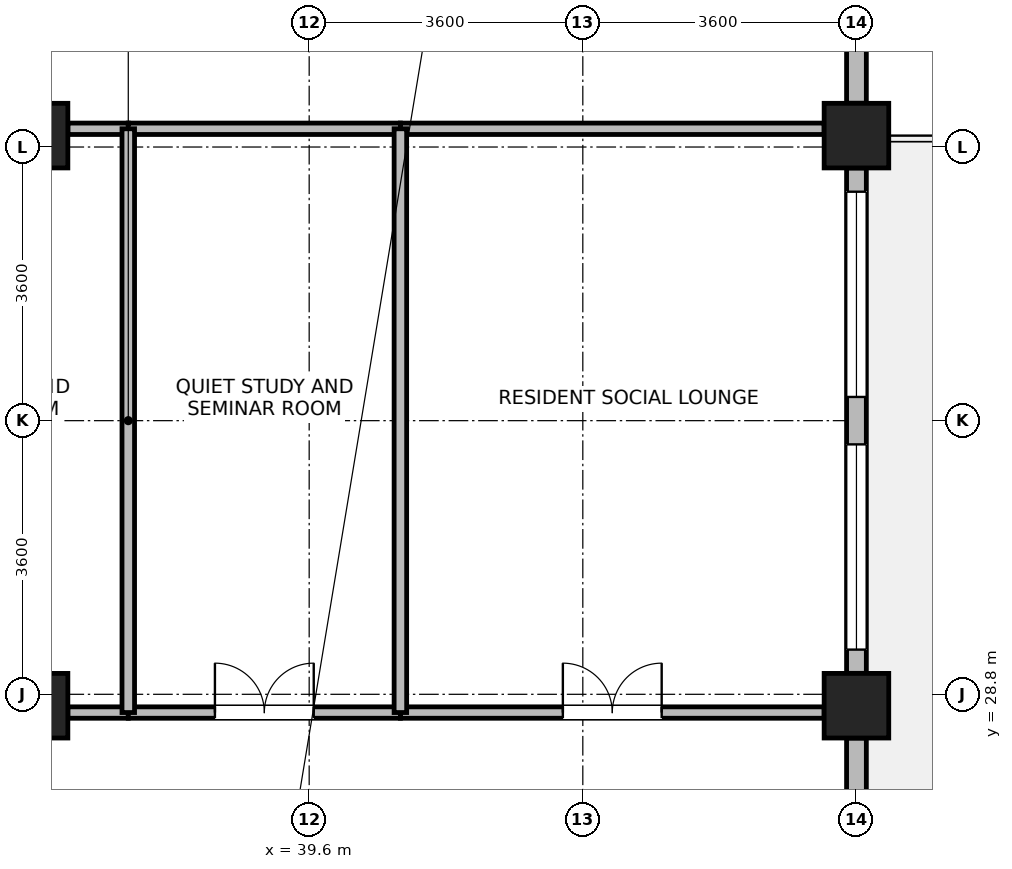
"""IFC4 building model, lengths in metres.
Left out: names, types, materials, properties, quantities, classifications, styles, units other than length and angle.
Written with IfcOpenShell. Run it as: python <this file> out.ifc"""

import sys

from ifc_helpers import new_model, si_unit, direction, frame, frame_2d, origin, origin_2d, place, context, subcontext, project, spatial, rectangle, extrude, source, transform, mapped, element, fill, save


model = new_model("IFC4")
c1 = context("Model", 3, precision=1e-05, world=origin(), true_north=direction((0.0, 1.0)))
c2 = subcontext(c1, "Body", "Model", "MODEL_VIEW")
j1 = project(units=[si_unit("LENGTHUNIT", "METRE"), si_unit("PLANEANGLEUNIT", "RADIAN")], contexts=[c1])
p1 = place(None, origin())
s1 = spatial("IfcSite", under=j1, at=p1, CompositionType="ELEMENT")
p2 = place(p1, origin())
s2 = spatial("IfcBuilding", under=s1, at=p2, CompositionType="ELEMENT")
p3 = place(p2, frame((0.0, 0.0, 249.9)))
s3 = spatial("IfcBuildingStorey", under=s2, at=p3, CompositionType="ELEMENT", Elevation=249.9)
m1 = source(origin(), c2, "Body", "SweptSolid", [
    extrude(rectangle(XDim=0.85, YDim=0.85, at=origin_2d()), origin(), (0.0, 0.0, 1.0), 3.7),
])
for number, where, z_axis, x_axis in (
    (1, (36.0, 28.65, 0.0), (0.0, 0.0, 1.0), (1.0, 0.0, 0.0)),
    (2, (36.0, 36.15, 0.0), (0.0, 0.0, 1.0), (1.0, 0.0, 0.0)),
    (3, (46.8, 28.65, 0.0), (0.0, 0.0, 1.0), (1.0, 0.0, 0.0)),
    (4, (46.8, 36.15, 0.0), (0.0, 0.0, 1.0), (1.0, 0.0, 0.0)),
):
    element("IfcColumn", number, at=place(p3, frame(where, z_axis=z_axis, x_axis=x_axis)), inside=s3, PredefinedType="COLUMN", context=c2, shape_type="MappedRepresentation", body=[
        mapped(m1, transform((0.0, 0.0, 0.0), x_axis=(1.0, 0.0, 0.0), y_axis=(0.0, 1.0, 0.0), z_axis=(0.0, 0.0, 1.0), scale=1.0)),
    ])
p4 = place(p3, frame((46.8, 28.224, 0.0), z_axis=(0.0, 0.0, 1.0), x_axis=(0.0, -1.0, 0.0)))
e5 = element("IfcWall", 5, at=p4, inside=s3, PredefinedType="STANDARD", context=c2, shape_type="SweptSolid", body=[
    extrude(rectangle(XDim=6.198, YDim=0.26, at=frame_2d((3.099, 0.0))), origin(), (0.0, 0.0, 1.0), 3.055),
])
p5 = place(p4, frame((2.199, 0.0, 0.0)))
e6 = element("IfcOpeningElement", 6, at=p5, cuts=e5, PredefinedType="OPENING", context=c2, shape_type="SweptSolid", body=[
    extrude(rectangle(XDim=1.8, YDim=2.2, at=frame_2d((0.9, 1.1))), frame((0.0, 0.14, 0.0), z_axis=(0.0, -1.0, 0.0), x_axis=(1.0, 0.0, 0.0)), (0.0, 0.0, 1.0), 0.28),
])
p6 = place(p3, frame((46.8, 35.724, 0.0), z_axis=(0.0, 0.0, 1.0), x_axis=(0.0, -1.0, 0.0)))
e7 = element("IfcWall", 7, at=p6, inside=s3, PredefinedType="STANDARD", context=c2, shape_type="SweptSolid", body=[
    extrude(rectangle(XDim=6.648, YDim=0.26, at=frame_2d((3.324, 0.0))), origin(), (0.0, 0.0, 1.0), 3.055),
])
p7 = place(p6, frame((0.312, 0.0, 0.85)))
e8 = element("IfcOpeningElement", 8, at=p7, cuts=e7, PredefinedType="OPENING", context=c2, shape_type="SweptSolid", body=[
    extrude(rectangle(XDim=2.7, YDim=2.05, at=frame_2d((1.35, 1.025))), frame((0.0, 0.14, 0.0), z_axis=(0.0, -1.0, 0.0), x_axis=(1.0, 0.0, 0.0)), (0.0, 0.0, 1.0), 0.28),
])
p8 = place(p6, frame((3.636, 0.0, 0.85)))
e9 = element("IfcOpeningElement", 9, at=p8, cuts=e7, PredefinedType="OPENING", context=c2, shape_type="SweptSolid", body=[
    extrude(rectangle(XDim=2.7, YDim=2.05, at=frame_2d((1.35, 1.025))), frame((0.0, 0.14, 0.0), z_axis=(0.0, -1.0, 0.0), x_axis=(1.0, 0.0, 0.0)), (0.0, 0.0, 1.0), 0.28),
])
p9 = place(p3, frame((46.8, 42.774, 0.0), z_axis=(0.0, 0.0, 1.0), x_axis=(0.0, -1.0, 0.0)))
e10 = element("IfcWall", 10, at=p9, inside=s3, PredefinedType="STANDARD", context=c2, shape_type="SweptSolid", body=[
    extrude(rectangle(XDim=6.198, YDim=0.26, at=frame_2d((3.099, 0.0))), origin(), (0.0, 0.0, 1.0), 3.055),
])
p10 = place(p9, frame((2.624, 0.0, 0.85)))
e11 = element("IfcOpeningElement", 11, at=p10, cuts=e10, PredefinedType="OPENING", context=c2, shape_type="SweptSolid", body=[
    extrude(rectangle(XDim=0.95, YDim=1.75, at=frame_2d((0.475, 0.875))), frame((0.0, 0.14, 0.0), z_axis=(0.0, -1.0, 0.0), x_axis=(1.0, 0.0, 0.0)), (0.0, 0.0, 1.0), 0.28),
])
p11 = place(p9, frame((1.087, 0.0, 0.85)))
e12 = element("IfcOpeningElement", 12, at=p11, cuts=e10, PredefinedType="OPENING", context=c2, shape_type="SweptSolid", body=[
    extrude(rectangle(XDim=0.95, YDim=1.75, at=frame_2d((0.475, 0.875))), frame((0.0, 0.14, 0.0), z_axis=(0.0, -1.0, 0.0), x_axis=(1.0, 0.0, 0.0)), (0.0, 0.0, 1.0), 0.28),
])
p12 = place(p3, frame((40.8, 28.56, 0.0), z_axis=(0.0, 0.0, 1.0), x_axis=(1.0, 0.0, 0.0)))
e13 = element("IfcWall", 13, at=p12, inside=s3, PredefinedType="PARTITIONING", context=c2, shape_type="SweptSolid", body=[
    extrude(rectangle(XDim=5.575, YDim=0.15, at=frame_2d((2.788, 0.0))), origin(), (0.0, 0.0, 1.0), 2.905),
])
p13 = place(p12, frame((2.137, 0.0, 0.0)))
e14 = element("IfcOpeningElement", 14, at=p13, cuts=e13, PredefinedType="OPENING", context=c2, shape_type="SweptSolid", body=[
    extrude(rectangle(XDim=1.3, YDim=2.12, at=frame_2d((0.65, 1.06))), frame((0.0, 0.085, 0.0), z_axis=(0.0, -1.0, 0.0), x_axis=(1.0, 0.0, 0.0)), (0.0, 0.0, 1.0), 0.17),
])
p14 = place(p3, frame((40.8, 36.24, 0.0), z_axis=(0.0, 0.0, 1.0), x_axis=(1.0, 0.0, 0.0)))
e15 = element("IfcWall", 15, at=p14, inside=s3, PredefinedType="PARTITIONING", context=c2, shape_type="SweptSolid", body=[
    extrude(rectangle(XDim=5.575, YDim=0.15, at=frame_2d((2.788, 0.0))), origin(), (0.0, 0.0, 1.0), 2.905),
])
for number, where, z_axis, x_axis in (
    (16, (36.425, 28.56, 0.0), (0.0, 0.0, 1.0), (1.0, 0.0, 0.0)),
    (17, (36.425, 36.24, 0.0), (0.0, 0.0, 1.0), (1.0, 0.0, 0.0)),
):
    element("IfcWall", number, at=place(p3, frame(where, z_axis=z_axis, x_axis=x_axis)), inside=s3, PredefinedType="PARTITIONING", context=c2, shape_type="SweptSolid", body=[
        extrude(rectangle(XDim=0.795, YDim=0.15, at=frame_2d((0.397, 0.0))), origin(), (0.0, 0.0, 1.0), 2.905),
    ])
p15 = place(p3, frame((37.22, 28.56, 0.0), z_axis=(0.0, 0.0, 1.0), x_axis=(1.0, 0.0, 0.0)))
e18 = element("IfcWall", 18, at=p15, inside=s3, PredefinedType="PARTITIONING", context=c2, shape_type="SweptSolid", body=[
    extrude(rectangle(XDim=3.58, YDim=0.15, at=frame_2d((1.79, 0.0))), origin(), (0.0, 0.0, 1.0), 2.905),
])
p16 = place(p15, frame((1.14, 0.0, 0.0)))
e19 = element("IfcOpeningElement", 19, at=p16, cuts=e18, PredefinedType="OPENING", context=c2, shape_type="SweptSolid", body=[
    extrude(rectangle(XDim=1.3, YDim=2.12, at=frame_2d((0.65, 1.06))), frame((0.0, 0.085, 0.0), z_axis=(0.0, -1.0, 0.0), x_axis=(1.0, 0.0, 0.0)), (0.0, 0.0, 1.0), 0.17),
])
p17 = place(p3, frame((37.22, 36.24, 0.0), z_axis=(0.0, 0.0, 1.0), x_axis=(1.0, 0.0, 0.0)))
e20 = element("IfcWall", 20, at=p17, inside=s3, PredefinedType="PARTITIONING", context=c2, shape_type="SweptSolid", body=[
    extrude(rectangle(XDim=3.58, YDim=0.15, at=frame_2d((1.79, 0.0))), origin(), (0.0, 0.0, 1.0), 2.905),
])
for number, where, z_axis, x_axis in (
    (21, (37.22, 28.56, 0.0), (0.0, 0.0, 1.0), (0.0, 1.0, 0.0)),
    (22, (40.8, 28.56, 0.0), (0.0, 0.0, 1.0), (0.0, 1.0, 0.0)),
):
    element("IfcWall", number, at=place(p3, frame(where, z_axis=z_axis, x_axis=x_axis)), inside=s3, PredefinedType="PARTITIONING", context=c2, shape_type="SweptSolid", body=[
        extrude(rectangle(XDim=7.68, YDim=0.165, at=frame_2d((3.84, 0.0))), origin(), (0.0, 0.0, 1.0), 3.455),
    ])
p18 = place(p7, origin())
e23 = element("IfcWindow", 23, at=p18, inside=s3, PartitioningType="SINGLE_PANEL", PredefinedType="WINDOW", context=c2, shape_type="SweptSolid", body=[
    extrude(rectangle(XDim=2.7, YDim=2.05, at=frame_2d((1.35, 1.025))), frame((0.0, 0.03, 0.0), z_axis=(0.0, -1.0, 0.0), x_axis=(1.0, 0.0, 0.0)), (0.0, 0.0, 1.0), 0.06),
])
fill(e8, e23)
p19 = place(p8, origin())
e24 = element("IfcWindow", 24, at=p19, inside=s3, PartitioningType="SINGLE_PANEL", PredefinedType="WINDOW", context=c2, shape_type="SweptSolid", body=[
    extrude(rectangle(XDim=2.7, YDim=2.05, at=frame_2d((1.35, 1.025))), frame((0.0, 0.03, 0.0), z_axis=(0.0, -1.0, 0.0), x_axis=(1.0, 0.0, 0.0)), (0.0, 0.0, 1.0), 0.06),
])
fill(e9, e24)
p20 = place(p13, origin())
e25 = element("IfcDoor", 25, at=p20, inside=s3, OperationType="DOUBLE_DOOR_SINGLE_SWING", PredefinedType="DOOR", context=c2, shape_type="SweptSolid", body=[
    extrude(rectangle(XDim=1.3, YDim=2.12, at=frame_2d((0.65, 1.06))), frame((0.0, 0.025, 0.0), z_axis=(0.0, -1.0, 0.0), x_axis=(1.0, 0.0, 0.0)), (0.0, 0.0, 1.0), 0.05),
])
fill(e14, e25)
p21 = place(p16, origin())
e26 = element("IfcDoor", 26, at=p21, inside=s3, OperationType="DOUBLE_DOOR_SINGLE_SWING", PredefinedType="DOOR", context=c2, shape_type="SweptSolid", body=[
    extrude(rectangle(XDim=1.3, YDim=2.12, at=frame_2d((0.65, 1.06))), frame((0.0, 0.025, 0.0), z_axis=(0.0, -1.0, 0.0), x_axis=(1.0, 0.0, 0.0)), (0.0, 0.0, 1.0), 0.05),
])
fill(e19, e26)
save(model, sys.argv[1])
